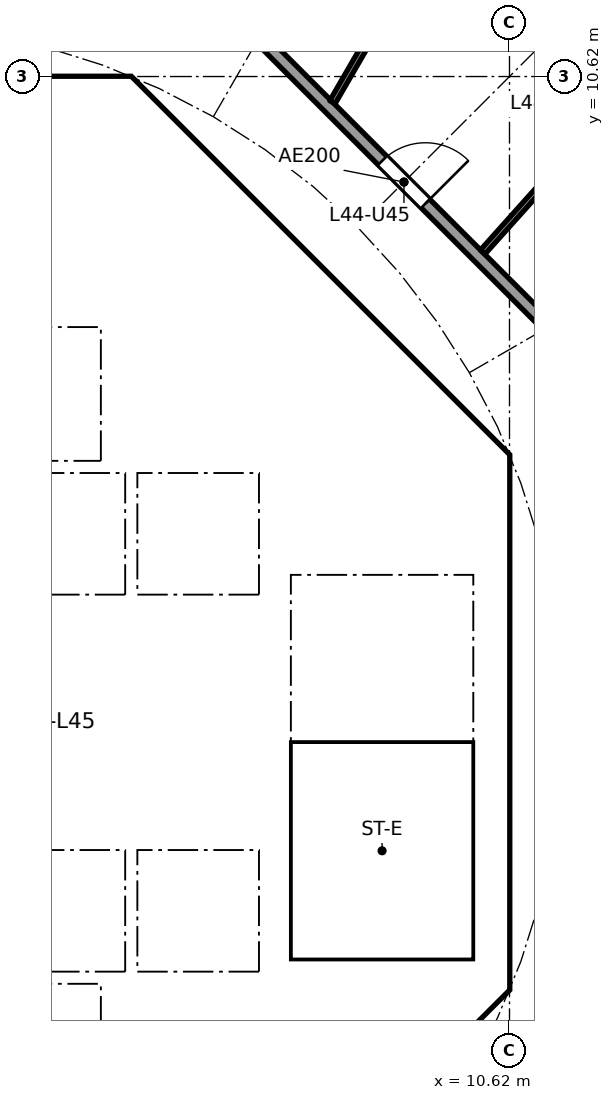
"""IFC4 building model, lengths in metres.
Left out: names, types, materials, properties, quantities, classifications, styles, units other than length and angle.
Written with IfcOpenShell. Run it as: python <this file> out.ifc"""

import sys

from ifc_helpers import new_model, si_unit, direction, frame, frame_2d, origin, place, context, subcontext, project, spatial, polyline, rectangle, outline, extrude, element, fill, save


model = new_model("IFC4")
c1 = context("Model", 3, precision=1e-05, world=origin(), true_north=direction((0.0, 1.0)))
c2 = subcontext(c1, "Body", "Model", "MODEL_VIEW")
j1 = project(units=[si_unit("LENGTHUNIT", "METRE"), si_unit("PLANEANGLEUNIT", "RADIAN")], contexts=[c1])
p1 = place(None, origin())
s1 = spatial("IfcSite", under=j1, at=p1, CompositionType="ELEMENT")
p2 = place(p1, origin())
s2 = spatial("IfcBuilding", under=s1, at=p2, CompositionType="ELEMENT")
p3 = place(p2, frame((0.0, 0.0, 177.0)))
s3 = spatial("IfcBuildingStorey", under=s2, at=p3, CompositionType="ELEMENT", Elevation=177.0)
p4 = place(p3, frame((9.988, 4.613, 0.0), z_axis=(0.0, 0.0, 1.0), x_axis=(-0.707106781187, 0.707106781187, 0.0)))
e1 = element("IfcWall", 1, at=p4, inside=s3, PredefinedType="SHEAR", context=c2, shape_type="SweptSolid", body=[
    extrude(rectangle(XDim=7.602, YDim=0.6, at=frame_2d((3.801, 0.0))), origin(), (0.0, 0.0, 1.0), 3.44),
])
p5 = place(p4, frame((3.201, 0.0, 0.0)))
e2 = element("IfcOpeningElement", 2, at=p5, cuts=e1, PredefinedType="OPENING", context=c2, shape_type="SweptSolid", body=[
    extrude(rectangle(XDim=1.2, YDim=2.1, at=frame_2d((0.6, 1.05))), frame((0.0, 0.31, 0.0), z_axis=(0.0, -1.0, 0.0), x_axis=(1.0, 0.0, 0.0)), (0.0, 0.0, 1.0), 0.62),
])
p6 = place(p3, frame((4.613, -9.988, 0.0), z_axis=(0.0, 0.0, 1.0), x_axis=(0.707106781187, 0.707106781187, 0.0)))
e3 = element("IfcWall", 3, at=p6, inside=s3, PredefinedType="SHEAR", context=c2, shape_type="SweptSolid", body=[
    extrude(rectangle(XDim=7.602, YDim=0.6, at=frame_2d((3.801, 0.0))), origin(), (0.0, 0.0, 1.0), 3.44),
])
p7 = place(p6, frame((3.201, 0.0, 0.0)))
e4 = element("IfcOpeningElement", 4, at=p7, cuts=e3, PredefinedType="OPENING", context=c2, shape_type="SweptSolid", body=[
    extrude(rectangle(XDim=1.2, YDim=2.1, at=frame_2d((0.6, 1.05))), frame((0.0, 0.31, 0.0), z_axis=(0.0, -1.0, 0.0), x_axis=(1.0, 0.0, 0.0)), (0.0, 0.0, 1.0), 0.62),
])
p8 = place(p3, frame((4.0, 4.3, 0.0), z_axis=(0.0, 0.0, 1.0), x_axis=(0.0, 1.0, 0.0)))
e5 = element("IfcWall", 5, at=p8, inside=s3, PredefinedType="SOLIDWALL", context=c2, shape_type="SweptSolid", body=[
    extrude(rectangle(XDim=2.2, YDim=0.2, at=frame_2d((1.1, 0.0))), origin(), (0.0, 0.0, 1.0), 3.44),
])
p9 = place(p8, frame((0.55, 0.0, 0.0)))
e6 = element("IfcOpeningElement", 6, at=p9, cuts=e5, PredefinedType="OPENING", context=c2, shape_type="SweptSolid", body=[
    extrude(rectangle(XDim=1.1, YDim=2.1, at=frame_2d((0.55, 1.05))), frame((0.0, 0.11, 0.0), z_axis=(0.0, -1.0, 0.0), x_axis=(1.0, 0.0, 0.0)), (0.0, 0.0, 1.0), 0.22),
])
p10 = place(p3, frame((-6.7, 2.0, 0.0), z_axis=(0.0, 0.0, 1.0), x_axis=(1.0, 0.0, 0.0)))
e7 = element("IfcWall", 7, at=p10, inside=s3, PredefinedType="SOLIDWALL", context=c2, shape_type="SweptSolid", body=[
    extrude(rectangle(XDim=13.4, YDim=0.2, at=frame_2d((6.7, 0.0))), origin(), (0.0, 0.0, 1.0), 3.44),
])
p11 = place(p10, frame((7.25, 0.0, 0.0)))
e8 = element("IfcOpeningElement", 8, at=p11, cuts=e7, PredefinedType="OPENING", context=c2, shape_type="SweptSolid", body=[
    extrude(rectangle(XDim=1.1, YDim=2.1, at=frame_2d((0.55, 1.05))), frame((0.0, 0.11, 0.0), z_axis=(0.0, -1.0, 0.0), x_axis=(1.0, 0.0, 0.0)), (0.0, 0.0, 1.0), 0.22),
])
p12 = place(p10, frame((9.45, 0.0, 0.0)))
e9 = element("IfcOpeningElement", 9, at=p12, cuts=e7, PredefinedType="OPENING", context=c2, shape_type="SweptSolid", body=[
    extrude(rectangle(XDim=1.1, YDim=2.1, at=frame_2d((0.55, 1.05))), frame((0.0, 0.11, 0.0), z_axis=(0.0, -1.0, 0.0), x_axis=(1.0, 0.0, 0.0)), (0.0, 0.0, 1.0), 0.22),
])
p13 = place(p10, frame((0.75, 0.0, 0.0)))
e10 = element("IfcOpeningElement", 10, at=p13, cuts=e7, PredefinedType="OPENING", context=c2, shape_type="SweptSolid", body=[
    extrude(rectangle(XDim=0.9, YDim=2.1, at=frame_2d((0.45, 1.05))), frame((0.0, 0.11, 0.0), z_axis=(0.0, -1.0, 0.0), x_axis=(1.0, 0.0, 0.0)), (0.0, 0.0, 1.0), 0.22),
])
p14 = place(p10, frame((4.05, 0.0, 0.0)))
e11 = element("IfcOpeningElement", 11, at=p14, cuts=e7, PredefinedType="OPENING", context=c2, shape_type="SweptSolid", body=[
    extrude(rectangle(XDim=0.9, YDim=2.1, at=frame_2d((0.45, 1.05))), frame((0.0, 0.11, 0.0), z_axis=(0.0, -1.0, 0.0), x_axis=(1.0, 0.0, 0.0)), (0.0, 0.0, 1.0), 0.22),
])
p15 = place(p3, frame((6.7, 4.0, 0.0), z_axis=(0.0, 0.0, 1.0), x_axis=(1.0, 0.0, 0.0)))
e12 = element("IfcWall", 12, at=p15, inside=s3, PredefinedType="SOLIDWALL", context=c2, shape_type="SweptSolid", body=[
    extrude(rectangle(XDim=3.325, YDim=0.2, at=frame_2d((1.662, 0.0))), origin(), (0.0, 0.0, 1.0), 3.44),
])
p16 = place(p15, frame((1.25, 0.0, 0.0)))
e13 = element("IfcOpeningElement", 13, at=p16, cuts=e12, PredefinedType="OPENING", context=c2, shape_type="SweptSolid", body=[
    extrude(rectangle(XDim=1.1, YDim=2.1, at=frame_2d((0.55, 1.05))), frame((0.0, 0.11, 0.0), z_axis=(0.0, -1.0, 0.0), x_axis=(1.0, 0.0, 0.0)), (0.0, 0.0, 1.0), 0.22),
])
p17 = place(p3, frame((4.0, 7.025, 0.0), z_axis=(0.0, 0.0, 1.0), x_axis=(0.0, 1.0, 0.0)))
e14 = element("IfcWall", 14, at=p17, inside=s3, PredefinedType="SOLIDWALL", context=c2, shape_type="SweptSolid", body=[
    extrude(rectangle(XDim=3.0, YDim=0.2, at=frame_2d((1.5, 0.0))), origin(), (0.0, 0.0, 1.0), 3.44),
])
p18 = place(p17, frame((0.925, 0.0, 0.0)))
e15 = element("IfcOpeningElement", 15, at=p18, cuts=e14, PredefinedType="OPENING", context=c2, shape_type="SweptSolid", body=[
    extrude(rectangle(XDim=1.1, YDim=2.1, at=frame_2d((0.55, 1.05))), frame((0.0, 0.11, 0.0), z_axis=(0.0, -1.0, 0.0), x_axis=(1.0, 0.0, 0.0)), (0.0, 0.0, 1.0), 0.22),
])
p19 = place(p3, frame((4.0, -6.5, 0.0), z_axis=(0.0, 0.0, 1.0), x_axis=(0.0, 1.0, 0.0)))
e16 = element("IfcWall", 16, at=p19, inside=s3, PredefinedType="SOLIDWALL", context=c2, shape_type="SweptSolid", body=[
    extrude(rectangle(XDim=2.2, YDim=0.2, at=frame_2d((1.1, 0.0))), origin(), (0.0, 0.0, 1.0), 3.44),
])
p20 = place(p19, frame((0.55, 0.0, 0.0)))
e17 = element("IfcOpeningElement", 17, at=p20, cuts=e16, PredefinedType="OPENING", context=c2, shape_type="SweptSolid", body=[
    extrude(rectangle(XDim=1.1, YDim=2.1, at=frame_2d((0.55, 1.05))), frame((0.0, 0.11, 0.0), z_axis=(0.0, -1.0, 0.0), x_axis=(1.0, 0.0, 0.0)), (0.0, 0.0, 1.0), 0.22),
])
p21 = place(p3, frame((-6.7, -2.0, 0.0), z_axis=(0.0, 0.0, 1.0), x_axis=(1.0, 0.0, 0.0)))
e18 = element("IfcWall", 18, at=p21, inside=s3, PredefinedType="SOLIDWALL", context=c2, shape_type="SweptSolid", body=[
    extrude(rectangle(XDim=13.4, YDim=0.2, at=frame_2d((6.7, 0.0))), origin(), (0.0, 0.0, 1.0), 3.44),
])
p22 = place(p21, frame((5.05, 0.0, 0.0)))
e19 = element("IfcOpeningElement", 19, at=p22, cuts=e18, PredefinedType="OPENING", context=c2, shape_type="SweptSolid", body=[
    extrude(rectangle(XDim=1.1, YDim=2.1, at=frame_2d((0.55, 1.05))), frame((0.0, 0.11, 0.0), z_axis=(0.0, -1.0, 0.0), x_axis=(1.0, 0.0, 0.0)), (0.0, 0.0, 1.0), 0.22),
])
p23 = place(p21, frame((7.25, 0.0, 0.0)))
e20 = element("IfcOpeningElement", 20, at=p23, cuts=e18, PredefinedType="OPENING", context=c2, shape_type="SweptSolid", body=[
    extrude(rectangle(XDim=1.1, YDim=2.1, at=frame_2d((0.55, 1.05))), frame((0.0, 0.11, 0.0), z_axis=(0.0, -1.0, 0.0), x_axis=(1.0, 0.0, 0.0)), (0.0, 0.0, 1.0), 0.22),
])
p24 = place(p21, frame((1.85, 0.0, 0.0)))
e21 = element("IfcOpeningElement", 21, at=p24, cuts=e18, PredefinedType="OPENING", context=c2, shape_type="SweptSolid", body=[
    extrude(rectangle(XDim=0.9, YDim=2.1, at=frame_2d((0.45, 1.05))), frame((0.0, 0.11, 0.0), z_axis=(0.0, -1.0, 0.0), x_axis=(1.0, 0.0, 0.0)), (0.0, 0.0, 1.0), 0.22),
])
p25 = place(p3, origin())
e22 = element("IfcWall", 22, at=p25, inside=s3, PredefinedType="SHEAR", context=c2, shape_type="SweptSolid", body=[
    extrude(outline(polyline([(-4.152, 10.025), (-4.401, 9.776), (-4.825, 10.2), (-4.401, 10.625), (4.401, 10.625), (4.825, 10.2), (4.401, 9.776), (4.152, 10.025), (-4.152, 10.025)])), origin(), (0.0, 0.0, 1.0), 3.44),
])
p26 = place(p3, origin())
e23 = element("IfcWall", 23, at=p26, inside=s3, PredefinedType="SHEAR", context=c2, shape_type="SweptSolid", body=[
    extrude(outline(polyline([(9.776, -4.401), (10.025, -4.152), (10.025, -3.801), (10.025, 4.152), (9.776, 4.401), (10.2, 4.825), (10.625, 4.401), (10.625, -4.401), (10.2, -4.825), (9.776, -4.401)])), origin(), (0.0, 0.0, 1.0), 3.44),
])
p27 = place(p3, origin())
e24 = element("IfcWall", 24, at=p27, inside=s3, PredefinedType="SOLIDWALL", context=c2, shape_type="SweptSolid", body=[
    extrude(outline(polyline([(-6.7, 4.3), (6.7, 4.3), (6.7, 2.1), (6.5, 2.1), (6.5, 4.1), (4.5, 4.1), (4.5, 2.1), (4.3, 2.1), (4.3, 4.1), (2.3, 4.1), (2.3, 2.1), (2.1, 2.1), (2.1, 4.1), (0.1, 4.1), (0.1, 2.1), (-0.1, 2.1), (-0.1, 4.1), (-4.3, 4.1), (-4.3, 2.1), (-4.5, 2.1), (-4.5, 4.1), (-6.5, 4.1), (-6.5, 2.1), (-6.7, 2.1), (-6.7, 4.3)])), origin(), (0.0, 0.0, 1.0), 3.44),
])
p28 = place(p3, origin())
e25 = element("IfcWall", 25, at=p28, inside=s3, PredefinedType="SOLIDWALL", context=c2, shape_type="SweptSolid", body=[
    extrude(outline(polyline([(-6.7, -2.1), (-6.5, -2.1), (-6.5, -4.1), (-2.3, -4.1), (-2.3, -2.1), (-2.1, -2.1), (-2.1, -4.1), (-0.1, -4.1), (-0.1, -2.1), (0.1, -2.1), (0.1, -4.1), (2.1, -4.1), (2.1, -2.1), (2.3, -2.1), (2.3, -4.1), (4.3, -4.1), (4.3, -2.1), (4.5, -2.1), (4.5, -4.1), (6.5, -4.1), (6.5, -2.1), (6.7, -2.1), (6.7, -4.3), (-6.7, -4.3), (-6.7, -2.1)])), origin(), (0.0, 0.0, 1.0), 3.44),
])
p29 = place(p3, origin())
e26 = element("IfcWall", 26, at=p29, inside=s3, PredefinedType="SOLIDWALL", context=c2, shape_type="SweptSolid", body=[
    extrude(outline(polyline([(4.1, 6.5), (-4.1, 6.5), (-4.1, 7.025), (4.1, 7.025), (4.1, 6.5)])), origin(), (0.0, 0.0, 1.0), 3.44),
])
p30 = place(p3, origin())
e27 = element("IfcWall", 27, at=p30, inside=s3, PredefinedType="SOLIDWALL", context=c2, shape_type="SweptSolid", body=[
    extrude(outline(polyline([(7.025, -3.9), (6.7, -3.9), (6.7, 3.9), (7.025, 3.9), (7.025, -3.9)])), origin(), (0.0, 0.0, 1.0), 3.44),
])
p31 = place(p3, origin())
e28 = element("IfcWall", 28, at=p31, inside=s3, PredefinedType="SOLIDWALL", context=c2, shape_type="SweptSolid", body=[
    extrude(outline(polyline([(10.025, -4.1), (6.7, -4.1), (6.7, -3.9), (10.025, -3.9), (10.025, -4.1)])), origin(), (0.0, 0.0, 1.0), 3.44),
])
p32 = place(p3, frame((12.635, 5.134, 0.0), z_axis=(0.0, 0.0, 1.0), x_axis=(-0.707106781187, 0.707106781187, 0.0)))
e29 = element("IfcWall", 29, at=p32, inside=s3, PredefinedType="PARTITIONING", context=c2, shape_type="SweptSolid", body=[
    extrude(rectangle(XDim=10.609, YDim=0.2, at=frame_2d((5.305, 0.0))), origin(), (0.0, 0.0, 1.0), 3.44),
])
p33 = place(p32, frame((4.804, 0.0, 0.0)))
e30 = element("IfcOpeningElement", 30, at=p33, cuts=e29, PredefinedType="OPENING", context=c2, shape_type="SweptSolid", body=[
    extrude(rectangle(XDim=1.0, YDim=2.1, at=frame_2d((0.5, 1.05))), frame((0.0, 0.11, 0.0), z_axis=(0.0, -1.0, 0.0), x_axis=(1.0, 0.0, 0.0)), (0.0, 0.0, 1.0), 0.22),
])
p34 = place(p3, frame((10.178, 7.732, 0.0), z_axis=(0.0, 0.0, 1.0), x_axis=(0.667280084362, 0.744806880348, 0.0)))
e31 = element("IfcWall", 31, at=p34, inside=s3, PredefinedType="PARTITIONING", context=c2, shape_type="SweptSolid", body=[
    extrude(rectangle(XDim=10.572, YDim=0.1, at=frame_2d((5.286, 0.0))), origin(), (0.0, 0.0, 1.0), 2.756),
])
p35 = place(p34, frame((2.07, 0.0, 0.0)))
e32 = element("IfcOpeningElement", 32, at=p35, cuts=e31, PredefinedType="OPENING", context=c2, shape_type="SweptSolid", body=[
    extrude(rectangle(XDim=0.9, YDim=2.1, at=frame_2d((0.45, 1.05))), frame((0.0, 0.06, 0.0), z_axis=(0.0, -1.0, 0.0), x_axis=(1.0, 0.0, 0.0)), (0.0, 0.0, 1.0), 0.12),
])
p36 = place(p34, frame((7.331, 0.0, 0.0)))
e33 = element("IfcOpeningElement", 33, at=p36, cuts=e31, PredefinedType="OPENING", context=c2, shape_type="SweptSolid", body=[
    extrude(rectangle(XDim=0.9, YDim=2.1, at=frame_2d((0.45, 1.05))), frame((0.0, 0.06, 0.0), z_axis=(0.0, -1.0, 0.0), x_axis=(1.0, 0.0, 0.0)), (0.0, 0.0, 1.0), 0.12),
])
p37 = place(p3, frame((7.708, 10.198, 0.0), z_axis=(0.0, 0.0, 1.0), x_axis=(0.501305229744, 0.865270516446, 0.0)))
e34 = element("IfcWall", 34, at=p37, inside=s3, PredefinedType="PARTITIONING", context=c2, shape_type="SweptSolid", body=[
    extrude(rectangle(XDim=16.064, YDim=0.1, at=frame_2d((8.032, 0.0))), origin(), (0.0, 0.0, 1.0), 2.756),
])
p38 = place(p37, frame((2.082, 0.0, 0.0)))
e35 = element("IfcOpeningElement", 35, at=p38, cuts=e34, PredefinedType="OPENING", context=c2, shape_type="SweptSolid", body=[
    extrude(rectangle(XDim=0.9, YDim=2.1, at=frame_2d((0.45, 1.05))), frame((0.0, 0.06, 0.0), z_axis=(0.0, -1.0, 0.0), x_axis=(1.0, 0.0, 0.0)), (0.0, 0.0, 1.0), 0.12),
])
p39 = place(p37, frame((7.369, 0.0, 0.0)))
e36 = element("IfcOpeningElement", 36, at=p39, cuts=e34, PredefinedType="OPENING", context=c2, shape_type="SweptSolid", body=[
    extrude(rectangle(XDim=0.9, YDim=2.1, at=frame_2d((0.45, 1.05))), frame((0.0, 0.06, 0.0), z_axis=(0.0, -1.0, 0.0), x_axis=(1.0, 0.0, 0.0)), (0.0, 0.0, 1.0), 0.12),
])
p40 = place(p37, frame((12.869, 0.0, 0.0)))
e37 = element("IfcOpeningElement", 37, at=p40, cuts=e34, PredefinedType="OPENING", context=c2, shape_type="SweptSolid", body=[
    extrude(rectangle(XDim=0.9, YDim=2.1, at=frame_2d((0.45, 1.05))), frame((0.0, 0.06, 0.0), z_axis=(0.0, -1.0, 0.0), x_axis=(1.0, 0.0, 0.0)), (0.0, 0.0, 1.0), 0.12),
])
p41 = place(p12, origin())
e38 = element("IfcDoor", 38, at=p41, inside=s3, OperationType="DOUBLE_DOOR_SLIDING", PredefinedType="DOOR", context=c2, shape_type="SweptSolid", body=[
    extrude(rectangle(XDim=1.1, YDim=2.1, at=frame_2d((0.55, 1.05))), frame((0.0, 0.025, 0.0), z_axis=(0.0, -1.0, 0.0), x_axis=(1.0, 0.0, 0.0)), (0.0, 0.0, 1.0), 0.05),
])
fill(e9, e38)
p42 = place(p9, origin())
e39 = element("IfcDoor", 39, at=p42, inside=s3, OperationType="DOUBLE_DOOR_SLIDING", PredefinedType="DOOR", context=c2, shape_type="SweptSolid", body=[
    extrude(rectangle(XDim=1.1, YDim=2.1, at=frame_2d((0.55, 1.05))), frame((0.0, 0.025, 0.0), z_axis=(0.0, -1.0, 0.0), x_axis=(1.0, 0.0, 0.0)), (0.0, 0.0, 1.0), 0.05),
])
fill(e6, e39)
p43 = place(p20, origin())
e40 = element("IfcDoor", 40, at=p43, inside=s3, OperationType="DOUBLE_DOOR_SLIDING", PredefinedType="DOOR", context=c2, shape_type="SweptSolid", body=[
    extrude(rectangle(XDim=1.1, YDim=2.1, at=frame_2d((0.55, 1.05))), frame((0.0, 0.025, 0.0), z_axis=(0.0, -1.0, 0.0), x_axis=(1.0, 0.0, 0.0)), (0.0, 0.0, 1.0), 0.05),
])
fill(e17, e40)
p44 = place(p16, frame((1.1, 0.0, 0.0), x_axis=(-1.0, 0.0, 0.0)))
e41 = element("IfcDoor", 41, at=p44, inside=s3, OperationType="SINGLE_SWING_LEFT", PredefinedType="DOOR", context=c2, shape_type="SweptSolid", body=[
    extrude(rectangle(XDim=1.1, YDim=2.1, at=frame_2d((0.55, 1.05))), frame((0.0, 0.025, 0.0), z_axis=(0.0, -1.0, 0.0), x_axis=(1.0, 0.0, 0.0)), (0.0, 0.0, 1.0), 0.05),
])
fill(e13, e41)
p45 = place(p18, origin())
e42 = element("IfcDoor", 42, at=p45, inside=s3, OperationType="SINGLE_SWING_RIGHT", PredefinedType="DOOR", context=c2, shape_type="SweptSolid", body=[
    extrude(rectangle(XDim=1.1, YDim=2.1, at=frame_2d((0.55, 1.05))), frame((0.0, 0.025, 0.0), z_axis=(0.0, -1.0, 0.0), x_axis=(1.0, 0.0, 0.0)), (0.0, 0.0, 1.0), 0.05),
])
fill(e15, e42)
p46 = place(p5, origin())
e43 = element("IfcDoor", 43, at=p46, inside=s3, OperationType="SINGLE_SWING_LEFT", PredefinedType="DOOR", context=c2, shape_type="SweptSolid", body=[
    extrude(rectangle(XDim=1.2, YDim=2.1, at=frame_2d((0.6, 1.05))), frame((0.0, 0.025, 0.0), z_axis=(0.0, -1.0, 0.0), x_axis=(1.0, 0.0, 0.0)), (0.0, 0.0, 1.0), 0.05),
])
fill(e2, e43)
p47 = place(p33, frame((1.0, 0.0, 0.0), x_axis=(-1.0, 0.0, 0.0)))
e44 = element("IfcDoor", 44, at=p47, inside=s3, OperationType="SINGLE_SWING_RIGHT", PredefinedType="DOOR", context=c2, shape_type="SweptSolid", body=[
    extrude(rectangle(XDim=1.0, YDim=2.1, at=frame_2d((0.5, 1.05))), frame((0.0, 0.025, 0.0), z_axis=(0.0, -1.0, 0.0), x_axis=(1.0, 0.0, 0.0)), (0.0, 0.0, 1.0), 0.05),
])
fill(e30, e44)
save(model, sys.argv[1])
